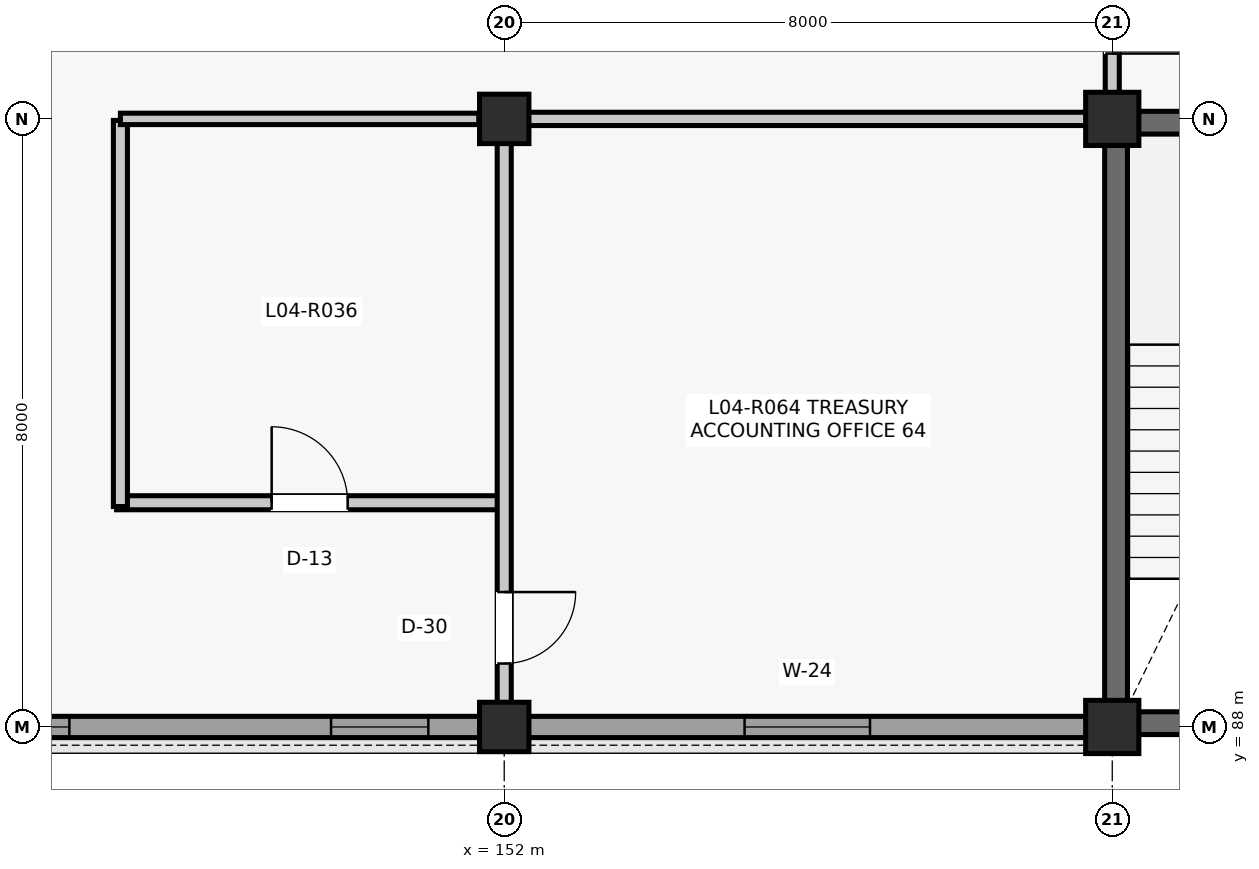
"""IFC4 building model, lengths in metres.
Left out: names, types, materials, properties, quantities, classifications, styles, units other than length and angle.
Written with IfcOpenShell. Run it as: python <this file> out.ifc"""

import sys

from ifc_helpers import new_model, si_unit, direction, frame, frame_2d, origin, origin_2d, place, context, subcontext, project, spatial, rectangle, extrude, element, fill, save


model = new_model("IFC4")
c1 = context("Model", 3, precision=1e-05, world=origin(), true_north=direction((0.0, 1.0)))
c2 = subcontext(c1, "Body", "Model", "MODEL_VIEW")
j1 = project(units=[si_unit("LENGTHUNIT", "METRE"), si_unit("PLANEANGLEUNIT", "RADIAN")], contexts=[c1])
p1 = place(None, origin())
s1 = spatial("IfcSite", under=j1, at=p1, CompositionType="ELEMENT")
p2 = place(p1, origin())
s2 = spatial("IfcBuilding", under=s1, at=p2, CompositionType="ELEMENT")
p3 = place(p2, frame((0.0, 0.0, 17.82)))
s3 = spatial("IfcBuildingStorey", under=s2, at=p3, CompositionType="ELEMENT", Elevation=17.82)
for number, where, z_axis, x_axis in (
    (1, (152.0, 88.0, 0.0), (0.0, 0.0, 1.0), (1.0, 0.0, 0.0)),
    (2, (152.0, 96.0, 0.0), (0.0, 0.0, 1.0), (1.0, 0.0, 0.0)),
):
    element("IfcColumn", number, at=place(p3, frame(where, z_axis=z_axis, x_axis=x_axis)), inside=s3, PredefinedType="COLUMN", context=c2, shape_type="SweptSolid", body=[
        extrude(rectangle(XDim=0.65, YDim=0.65, at=origin_2d()), origin(), (0.0, 0.0, 1.0), 3.96),
    ])
for number, where, z_axis, x_axis in (
    (3, (160.0, 88.0, 0.0), (0.0, 0.0, 1.0), (1.0, 0.0, 0.0)),
    (4, (160.0, 96.0, 0.0), (0.0, 0.0, 1.0), (1.0, 0.0, 0.0)),
):
    element("IfcColumn", number, at=place(p3, frame(where, z_axis=z_axis, x_axis=x_axis)), inside=s3, PredefinedType="COLUMN", context=c2, shape_type="SweptSolid", body=[
        extrude(rectangle(XDim=0.7, YDim=0.7, at=origin_2d()), origin(), (0.0, 0.0, 1.0), 3.96),
    ])
p4 = place(p3, frame((144.31, 88.0, 0.0), z_axis=(0.0, 0.0, 1.0), x_axis=(1.0, 0.0, 0.0)))
e5 = element("IfcWall", 5, at=p4, inside=s3, PredefinedType="SOLIDWALL", context=c2, shape_type="SweptSolid", body=[
    extrude(rectangle(XDim=7.38, YDim=0.28, at=frame_2d((3.69, 0.0))), origin(), (0.0, 0.0, 1.0), 3.374),
])
p5 = place(p4, frame((0.688, 0.0, 0.95)))
e6 = element("IfcOpeningElement", 6, at=p5, cuts=e5, PredefinedType="OPENING", context=c2, shape_type="SweptSolid", body=[
    extrude(rectangle(XDim=1.28, YDim=1.72, at=frame_2d((0.64, 0.86))), frame((0.0, 0.15, 0.0), z_axis=(0.0, -1.0, 0.0), x_axis=(1.0, 0.0, 0.0)), (0.0, 0.0, 1.0), 0.3),
])
p6 = place(p4, frame((5.412, 0.0, 0.95)))
e7 = element("IfcOpeningElement", 7, at=p6, cuts=e5, PredefinedType="OPENING", context=c2, shape_type="SweptSolid", body=[
    extrude(rectangle(XDim=1.28, YDim=1.72, at=frame_2d((0.64, 0.86))), frame((0.0, 0.15, 0.0), z_axis=(0.0, -1.0, 0.0), x_axis=(1.0, 0.0, 0.0)), (0.0, 0.0, 1.0), 0.3),
])
p7 = place(p3, frame((152.31, 88.0, 0.0), z_axis=(0.0, 0.0, 1.0), x_axis=(1.0, 0.0, 0.0)))
e8 = element("IfcWall", 8, at=p7, inside=s3, PredefinedType="SOLIDWALL", context=c2, shape_type="SweptSolid", body=[
    extrude(rectangle(XDim=7.355, YDim=0.28, at=frame_2d((3.677, 0.0))), origin(), (0.0, 0.0, 1.0), 3.314),
])
p8 = place(p7, frame((2.853, 0.0, 0.9)))
e9 = element("IfcOpeningElement", 9, at=p8, cuts=e8, PredefinedType="OPENING", context=c2, shape_type="SweptSolid", body=[
    extrude(rectangle(XDim=1.65, YDim=1.75, at=frame_2d((0.825, 0.875))), frame((0.0, 0.15, 0.0), z_axis=(0.0, -1.0, 0.0), x_axis=(1.0, 0.0, 0.0)), (0.0, 0.0, 1.0), 0.3),
])
p9 = place(p3, frame((160.05, 88.24, 0.0), z_axis=(0.0, 0.0, 1.0), x_axis=(0.0, 1.0, 0.0)))
e10 = element("IfcWall", 10, at=p9, inside=s3, PredefinedType="SHEAR", context=c2, shape_type="SweptSolid", body=[
    extrude(rectangle(XDim=7.52, YDim=0.3, at=frame_2d((3.76, 0.0))), origin(), (0.0, 0.0, 1.0), 3.263),
])
p10 = place(p3, frame((160.24, 95.95, 0.0), z_axis=(0.0, 0.0, 1.0), x_axis=(1.0, 0.0, 0.0)))
e11 = element("IfcWall", 11, at=p10, inside=s3, PredefinedType="SHEAR", context=c2, shape_type="SweptSolid", body=[
    extrude(rectangle(XDim=7.52, YDim=0.3, at=frame_2d((3.76, 0.0))), origin(), (0.0, 0.0, 1.0), 3.257),
])
p11 = place(p3, frame((160.24, 88.05, 0.0), z_axis=(0.0, 0.0, 1.0), x_axis=(1.0, 0.0, 0.0)))
e12 = element("IfcWall", 12, at=p11, inside=s3, PredefinedType="SHEAR", context=c2, shape_type="SweptSolid", body=[
    extrude(rectangle(XDim=3.91, YDim=0.3, at=frame_2d((1.955, 0.0))), origin(), (0.0, 0.0, 1.0), 3.37),
])
p12 = place(p3, frame((146.9, 90.95, 0.0), z_axis=(0.0, 0.0, 1.0), x_axis=(1.0, 0.0, 0.0)))
e13 = element("IfcWall", 13, at=p12, inside=s3, PredefinedType="PARTITIONING", context=c2, shape_type="SweptSolid", body=[
    extrude(rectangle(XDim=5.08, YDim=0.185, at=frame_2d((2.54, 0.0))), origin(), (0.0, 0.0, 1.0), 3.257),
])
p13 = place(p12, frame((2.04, 0.0, 0.0)))
e14 = element("IfcOpeningElement", 14, at=p13, cuts=e13, PredefinedType="OPENING", context=c2, shape_type="SweptSolid", body=[
    extrude(rectangle(XDim=1.0, YDim=2.15, at=frame_2d((0.5, 1.075))), frame((0.0, 0.103, 0.0), z_axis=(0.0, -1.0, 0.0), x_axis=(1.0, 0.0, 0.0)), (0.0, 0.0, 1.0), 0.205),
])
p14 = place(p3, frame((146.95, 90.9, 0.0), z_axis=(0.0, 0.0, 1.0), x_axis=(0.0, 1.0, 0.0)))
e15 = element("IfcWall", 15, at=p14, inside=s3, PredefinedType="PARTITIONING", context=c2, shape_type="SweptSolid", body=[
    extrude(rectangle(XDim=5.08, YDim=0.185, at=frame_2d((2.54, 0.0))), origin(), (0.0, 0.0, 1.0), 3.251),
])
p15 = place(p3, frame((146.95, 96.0, 0.0), z_axis=(0.0, 0.0, 1.0), x_axis=(1.0, 0.0, 0.0)))
e16 = element("IfcWall", 16, at=p15, inside=s3, PredefinedType="PARTITIONING", context=c2, shape_type="SweptSolid", body=[
    extrude(rectangle(XDim=4.715, YDim=0.15, at=frame_2d((2.357, 0.0))), origin(), (0.0, 0.0, 1.0), 3.251),
])
p16 = place(p3, frame((152.0, 88.315, 0.0), z_axis=(0.0, 0.0, 1.0), x_axis=(0.0, 1.0, 0.0)))
e17 = element("IfcWall", 17, at=p16, inside=s3, PredefinedType="PARTITIONING", context=c2, shape_type="SweptSolid", body=[
    extrude(rectangle(XDim=7.37, YDim=0.185, at=frame_2d((3.685, 0.0))), origin(), (0.0, 0.0, 1.0), 3.257),
])
p17 = place(p16, frame((0.52, 0.0, 0.0)))
e18 = element("IfcOpeningElement", 18, at=p17, cuts=e17, PredefinedType="OPENING", context=c2, shape_type="SweptSolid", body=[
    extrude(rectangle(XDim=0.94, YDim=2.12, at=frame_2d((0.47, 1.06))), frame((0.0, 0.103, 0.0), z_axis=(0.0, -1.0, 0.0), x_axis=(1.0, 0.0, 0.0)), (0.0, 0.0, 1.0), 0.205),
])
p18 = place(p3, frame((152.315, 96.0, 0.0), z_axis=(0.0, 0.0, 1.0), x_axis=(1.0, 0.0, 0.0)))
e19 = element("IfcWall", 19, at=p18, inside=s3, PredefinedType="PARTITIONING", context=c2, shape_type="SweptSolid", body=[
    extrude(rectangle(XDim=7.345, YDim=0.175, at=frame_2d((3.672, 0.0))), origin(), (0.0, 0.0, 1.0), 3.462),
])
p19 = place(p3, frame((160.0, 96.34, 0.0), z_axis=(0.0, 0.0, 1.0), x_axis=(0.0, 1.0, 0.0)))
e20 = element("IfcWall", 20, at=p19, inside=s3, PredefinedType="PARTITIONING", context=c2, shape_type="SweptSolid", body=[
    extrude(rectangle(XDim=7.345, YDim=0.185, at=frame_2d((3.672, 0.0))), origin(), (0.0, 0.0, 1.0), 3.462),
])
p20 = place(p19, frame((0.52, 0.0, 0.0)))
e21 = element("IfcOpeningElement", 21, at=p20, cuts=e20, PredefinedType="OPENING", context=c2, shape_type="SweptSolid", body=[
    extrude(rectangle(XDim=0.94, YDim=2.12, at=frame_2d((0.47, 1.06))), frame((0.0, 0.103, 0.0), z_axis=(0.0, -1.0, 0.0), x_axis=(1.0, 0.0, 0.0)), (0.0, 0.0, 1.0), 0.205),
])
p21 = place(p5, origin())
e22 = element("IfcWindow", 22, at=p21, inside=s3, PartitioningType="SINGLE_PANEL", PredefinedType="WINDOW", context=c2, shape_type="SweptSolid", body=[
    extrude(rectangle(XDim=1.28, YDim=1.72, at=frame_2d((0.64, 0.86))), frame((0.0, 0.03, 0.0), z_axis=(0.0, -1.0, 0.0), x_axis=(1.0, 0.0, 0.0)), (0.0, 0.0, 1.0), 0.06),
])
fill(e6, e22)
p22 = place(p6, origin())
e23 = element("IfcWindow", 23, at=p22, inside=s3, PartitioningType="SINGLE_PANEL", PredefinedType="WINDOW", context=c2, shape_type="SweptSolid", body=[
    extrude(rectangle(XDim=1.28, YDim=1.72, at=frame_2d((0.64, 0.86))), frame((0.0, 0.03, 0.0), z_axis=(0.0, -1.0, 0.0), x_axis=(1.0, 0.0, 0.0)), (0.0, 0.0, 1.0), 0.06),
])
fill(e7, e23)
p23 = place(p8, origin())
e24 = element("IfcWindow", 24, at=p23, inside=s3, PartitioningType="SINGLE_PANEL", PredefinedType="WINDOW", context=c2, shape_type="SweptSolid", body=[
    extrude(rectangle(XDim=1.65, YDim=1.75, at=frame_2d((0.825, 0.875))), frame((0.0, 0.03, 0.0), z_axis=(0.0, -1.0, 0.0), x_axis=(1.0, 0.0, 0.0)), (0.0, 0.0, 1.0), 0.06),
])
fill(e9, e24)
p24 = place(p13, origin())
e25 = element("IfcDoor", 25, at=p24, inside=s3, OperationType="SINGLE_SWING_LEFT", PredefinedType="DOOR", context=c2, shape_type="SweptSolid", body=[
    extrude(rectangle(XDim=1.0, YDim=2.15, at=frame_2d((0.5, 1.075))), frame((0.0, 0.025, 0.0), z_axis=(0.0, -1.0, 0.0), x_axis=(1.0, 0.0, 0.0)), (0.0, 0.0, 1.0), 0.05),
])
fill(e14, e25)
p25 = place(p17, frame((0.94, 0.0, 0.0), z_axis=(0.0, 0.0, 1.0), x_axis=(-1.0, 0.0, 0.0)))
e26 = element("IfcDoor", 26, at=p25, inside=s3, OperationType="SINGLE_SWING_RIGHT", PredefinedType="DOOR", context=c2, shape_type="SweptSolid", body=[
    extrude(rectangle(XDim=0.94, YDim=2.12, at=frame_2d((0.47, 1.06))), frame((0.0, 0.025, 0.0), z_axis=(0.0, -1.0, 0.0), x_axis=(1.0, 0.0, 0.0)), (0.0, 0.0, 1.0), 0.05),
])
fill(e18, e26)
p26 = place(p20, frame((0.94, 0.0, 0.0), z_axis=(0.0, 0.0, 1.0), x_axis=(-1.0, 0.0, 0.0)))
e27 = element("IfcDoor", 27, at=p26, inside=s3, OperationType="SINGLE_SWING_LEFT", PredefinedType="DOOR", context=c2, shape_type="SweptSolid", body=[
    extrude(rectangle(XDim=0.94, YDim=2.12, at=frame_2d((0.47, 1.06))), frame((0.0, 0.025, 0.0), z_axis=(0.0, -1.0, 0.0), x_axis=(1.0, 0.0, 0.0)), (0.0, 0.0, 1.0), 0.05),
])
fill(e21, e27)
save(model, sys.argv[1])
